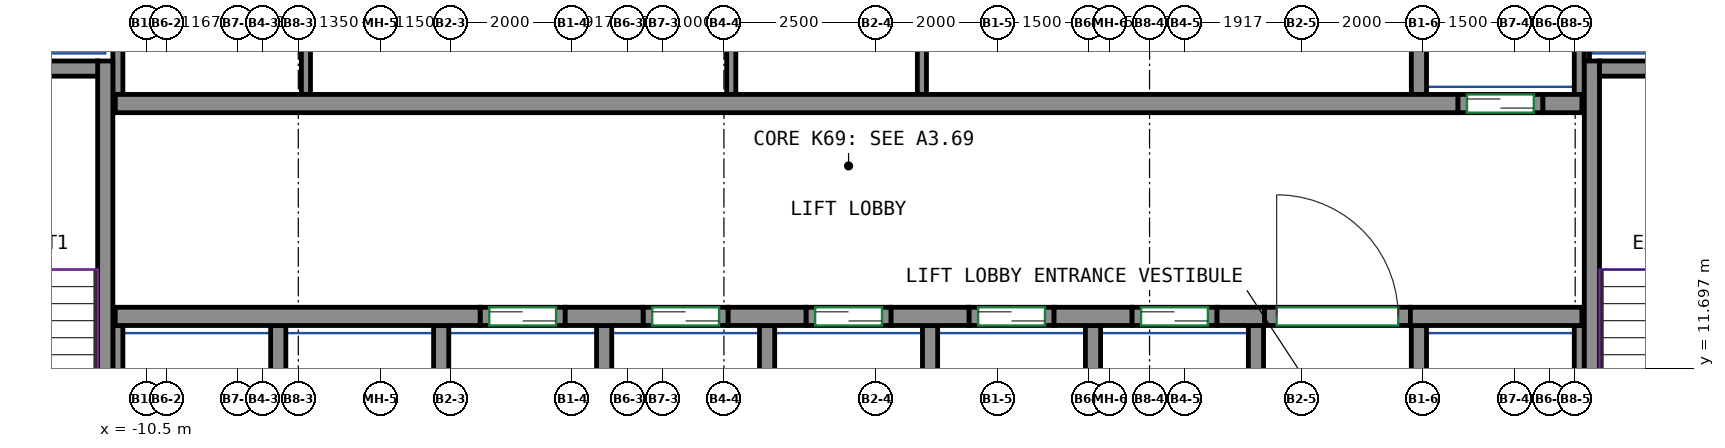
"""IFC4 building model, lengths in metres.
Left out: names, types, materials, properties, quantities, classifications, styles, units other than length and angle.
Written with IfcOpenShell. Run it as: python <this file> out.ifc"""

import sys

from ifc_helpers import new_model, si_unit, direction, frame, frame_2d, origin, place, context, subcontext, project, spatial, rectangle, extrude, source, transform, mapped, element, fill, save


model = new_model("IFC4")
c1 = context("Model", 3, precision=1e-05, world=origin(), true_north=direction((0.0, 1.0)))
c2 = subcontext(c1, "Body", "Model", "MODEL_VIEW")
j1 = project(units=[si_unit("LENGTHUNIT", "METRE"), si_unit("PLANEANGLEUNIT", "RADIAN")], contexts=[c1])
p1 = place(None, origin())
s1 = spatial("IfcSite", under=j1, at=p1, CompositionType="ELEMENT")
p2 = place(p1, origin())
s2 = spatial("IfcBuilding", under=s1, at=p2, CompositionType="ELEMENT")
p3 = place(p2, frame((0.0, 0.0, 277.2)))
s3 = spatial("IfcBuildingStorey", under=s2, at=p3, CompositionType="ELEMENT", Elevation=277.2)
m1 = source(origin(), c2, "Body", "SweptSolid", [
    extrude(rectangle(XDim=7.75, YDim=0.25, at=frame_2d((3.875, 0.0))), origin(), (0.0, 0.0, 1.0), 3.12),
])
p4 = place(p3, frame((-11.175, 9.0, 0.0), z_axis=(0.0, 0.0, 1.0), x_axis=(0.0, 1.0, 0.0)))
e1 = element("IfcWall", 1, at=p4, inside=s3, PredefinedType="SHEAR", context=c2, shape_type="MappedRepresentation", body=[
    mapped(m1, transform((0.0, 0.0, 0.0))),
])
m2 = source(origin(), c2, "Body", "SweptSolid", [
    extrude(rectangle(XDim=3.7, YDim=0.25, at=frame_2d((1.85, 0.0))), origin(), (0.0, 0.0, 1.0), 3.12),
])
p5 = place(p3, frame((-15.0, 16.625, 0.0), z_axis=(0.0, 0.0, 1.0), x_axis=(1.0, 0.0, 0.0)))
e2 = element("IfcWall", 2, at=p5, inside=s3, PredefinedType="SHEAR", context=c2, shape_type="MappedRepresentation", body=[
    mapped(m2, transform((0.0, 0.0, 0.0))),
])
p6 = place(p3, frame((13.275, 9.0, 0.0), z_axis=(0.0, 0.0, 1.0), x_axis=(0.0, 1.0, 0.0)))
e3 = element("IfcWall", 3, at=p6, inside=s3, PredefinedType="SHEAR", context=c2, shape_type="MappedRepresentation", body=[
    mapped(m1, transform((0.0, 0.0, 0.0))),
])
m3 = source(origin(), c2, "Body", "SweptSolid", [
    extrude(rectangle(XDim=3.7, YDim=0.25, at=frame_2d((1.85, 0.0))), origin(), (0.0, 0.0, 1.0), 3.12),
])
p7 = place(p3, frame((13.4, 16.625, 0.0), z_axis=(0.0, 0.0, 1.0), x_axis=(1.0, 0.0, 0.0)))
e4 = element("IfcWall", 4, at=p7, inside=s3, PredefinedType="SHEAR", context=c2, shape_type="MappedRepresentation", body=[
    mapped(m3, transform((0.0, 0.0, 0.0))),
])
m4 = source(origin(), c2, "Body", "SweptSolid", [
    extrude(rectangle(XDim=6.0, YDim=0.3, at=frame_2d((3.0, 0.0))), origin(), (0.0, 0.0, 1.0), 3.12),
])
p8 = place(p3, frame((-11.01, 12.55, 0.0), z_axis=(0.0, 0.0, 1.0), x_axis=(1.0, 0.0, 0.0)))
e5 = element("IfcWall", 5, at=p8, inside=s3, PredefinedType="SHEAR", context=c2, shape_type="MappedRepresentation", body=[
    mapped(m4, transform((0.0, 0.0, 0.0))),
])
m5 = source(origin(), c2, "Body", "SweptSolid", [
    extrude(rectangle(XDim=1.28, YDim=0.3, at=frame_2d((0.64, 0.0))), origin(), (0.0, 0.0, 1.0), 3.12),
])
for number, where, z_axis, x_axis in (
    (6, (-3.61, 12.55, 0.0), (0.0, 0.0, 1.0), (1.0, 0.0, 0.0)),
    (7, (-0.93, 12.55, 0.0), (0.0, 0.0, 1.0), (1.0, 0.0, 0.0)),
    (8, (1.75, 12.55, 0.0), (0.0, 0.0, 1.0), (1.0, 0.0, 0.0)),
    (9, (4.43, 12.55, 0.0), (0.0, 0.0, 1.0), (1.0, 0.0, 0.0)),
):
    element("IfcWall", number, at=place(p3, frame(where, z_axis=z_axis, x_axis=x_axis)), inside=s3, PredefinedType="SHEAR", context=c2, shape_type="MappedRepresentation", body=[
        mapped(m5, transform((0.0, 0.0, 0.0))),
    ])
m6 = source(origin(), c2, "Body", "SweptSolid", [
    extrude(rectangle(XDim=0.78, YDim=0.3, at=frame_2d((0.39, 0.0))), origin(), (0.0, 0.0, 1.0), 3.12),
])
p9 = place(p3, frame((7.11, 12.55, 0.0), z_axis=(0.0, 0.0, 1.0), x_axis=(1.0, 0.0, 0.0)))
e10 = element("IfcWall", 10, at=p9, inside=s3, PredefinedType="SHEAR", context=c2, shape_type="MappedRepresentation", body=[
    mapped(m6, transform((0.0, 0.0, 0.0))),
])
m7 = source(origin(), c2, "Body", "SweptSolid", [
    extrude(rectangle(XDim=2.82, YDim=0.3, at=frame_2d((1.41, 0.0))), origin(), (0.0, 0.0, 1.0), 3.12),
])
p10 = place(p3, frame((10.29, 12.55, 0.0), z_axis=(0.0, 0.0, 1.0), x_axis=(1.0, 0.0, 0.0)))
e11 = element("IfcWall", 11, at=p10, inside=s3, PredefinedType="SHEAR", context=c2, shape_type="MappedRepresentation", body=[
    mapped(m7, transform((0.0, 0.0, 0.0))),
])
m8 = source(origin(), c2, "Body", "SweptSolid", [
    extrude(rectangle(XDim=22.08, YDim=0.3, at=frame_2d((11.04, 0.0))), origin(), (0.0, 0.0, 1.0), 3.12),
])
p11 = place(p3, frame((-11.01, 16.05, 0.0), z_axis=(0.0, 0.0, 1.0), x_axis=(1.0, 0.0, 0.0)))
e12 = element("IfcWall", 12, at=p11, inside=s3, PredefinedType="SHEAR", context=c2, shape_type="MappedRepresentation", body=[
    mapped(m8, transform((0.0, 0.0, 0.0))),
])
m9 = source(origin(), c2, "Body", "SweptSolid", [
    extrude(rectangle(XDim=0.64, YDim=0.3, at=frame_2d((0.32, 0.0))), origin(), (0.0, 0.0, 1.0), 3.12),
])
p12 = place(p3, frame((12.47, 16.05, 0.0), z_axis=(0.0, 0.0, 1.0), x_axis=(1.0, 0.0, 0.0)))
e13 = element("IfcWall", 13, at=p12, inside=s3, PredefinedType="SHEAR", context=c2, shape_type="MappedRepresentation", body=[
    mapped(m9, transform((0.0, 0.0, 0.0))),
])
m10 = source(origin(), c2, "Body", "SweptSolid", [
    extrude(rectangle(XDim=1.4, YDim=0.3, at=frame_2d((0.7, 0.0))), origin(), (0.0, 0.0, 1.0), 3.12),
])
p13 = place(p3, frame((-5.01, 12.55, 0.0), z_axis=(0.0, 0.0, 1.0), x_axis=(1.0, 0.0, 0.0)))
e14 = element("IfcWall", 14, at=p13, inside=s3, PredefinedType="PARTITIONING", context=c2, shape_type="MappedRepresentation", body=[
    mapped(m10, transform((0.0, 0.0, 0.0))),
])
p14 = place(p13, frame((0.15, 0.0, 0.0)))
e15 = element("IfcOpeningElement", 15, at=p14, cuts=e14, PredefinedType="OPENING", context=c2, shape_type="SweptSolid", body=[
    extrude(rectangle(XDim=1.1, YDim=2.1, at=frame_2d((0.55, 1.05))), frame((0.0, 0.16, 0.0), z_axis=(0.0, -1.0, 0.0), x_axis=(1.0, 0.0, 0.0)), (0.0, 0.0, 1.0), 0.32),
])
m11 = source(origin(), c2, "Body", "SweptSolid", [
    extrude(rectangle(XDim=1.4, YDim=0.3, at=frame_2d((0.7, 0.0))), origin(), (0.0, 0.0, 1.0), 3.12),
])
p15 = place(p3, frame((-2.33, 12.55, 0.0), z_axis=(0.0, 0.0, 1.0), x_axis=(1.0, 0.0, 0.0)))
e16 = element("IfcWall", 16, at=p15, inside=s3, PredefinedType="PARTITIONING", context=c2, shape_type="MappedRepresentation", body=[
    mapped(m11, transform((0.0, 0.0, 0.0))),
])
p16 = place(p15, frame((0.15, 0.0, 0.0)))
e17 = element("IfcOpeningElement", 17, at=p16, cuts=e16, PredefinedType="OPENING", context=c2, shape_type="SweptSolid", body=[
    extrude(rectangle(XDim=1.1, YDim=2.1, at=frame_2d((0.55, 1.05))), frame((0.0, 0.16, 0.0), z_axis=(0.0, -1.0, 0.0), x_axis=(1.0, 0.0, 0.0)), (0.0, 0.0, 1.0), 0.32),
])
p17 = place(p3, frame((0.35, 12.55, 0.0), z_axis=(0.0, 0.0, 1.0), x_axis=(1.0, 0.0, 0.0)))
e18 = element("IfcWall", 18, at=p17, inside=s3, PredefinedType="PARTITIONING", context=c2, shape_type="MappedRepresentation", body=[
    mapped(m10, transform((0.0, 0.0, 0.0))),
])
p18 = place(p17, frame((0.15, 0.0, 0.0)))
e19 = element("IfcOpeningElement", 19, at=p18, cuts=e18, PredefinedType="OPENING", context=c2, shape_type="SweptSolid", body=[
    extrude(rectangle(XDim=1.1, YDim=2.1, at=frame_2d((0.55, 1.05))), frame((0.0, 0.16, 0.0), z_axis=(0.0, -1.0, 0.0), x_axis=(1.0, 0.0, 0.0)), (0.0, 0.0, 1.0), 0.32),
])
p19 = place(p3, frame((3.03, 12.55, 0.0), z_axis=(0.0, 0.0, 1.0), x_axis=(1.0, 0.0, 0.0)))
e20 = element("IfcWall", 20, at=p19, inside=s3, PredefinedType="PARTITIONING", context=c2, shape_type="MappedRepresentation", body=[
    mapped(m10, transform((0.0, 0.0, 0.0))),
])
p20 = place(p19, frame((0.15, 0.0, 0.0)))
e21 = element("IfcOpeningElement", 21, at=p20, cuts=e20, PredefinedType="OPENING", context=c2, shape_type="SweptSolid", body=[
    extrude(rectangle(XDim=1.1, YDim=2.1, at=frame_2d((0.55, 1.05))), frame((0.0, 0.16, 0.0), z_axis=(0.0, -1.0, 0.0), x_axis=(1.0, 0.0, 0.0)), (0.0, 0.0, 1.0), 0.32),
])
p21 = place(p3, frame((5.71, 12.55, 0.0), z_axis=(0.0, 0.0, 1.0), x_axis=(1.0, 0.0, 0.0)))
e22 = element("IfcWall", 22, at=p21, inside=s3, PredefinedType="PARTITIONING", context=c2, shape_type="MappedRepresentation", body=[
    mapped(m11, transform((0.0, 0.0, 0.0))),
])
p22 = place(p21, frame((0.15, 0.0, 0.0)))
e23 = element("IfcOpeningElement", 23, at=p22, cuts=e22, PredefinedType="OPENING", context=c2, shape_type="SweptSolid", body=[
    extrude(rectangle(XDim=1.1, YDim=2.1, at=frame_2d((0.55, 1.05))), frame((0.0, 0.16, 0.0), z_axis=(0.0, -1.0, 0.0), x_axis=(1.0, 0.0, 0.0)), (0.0, 0.0, 1.0), 0.32),
])
p23 = place(p3, frame((11.07, 16.05, 0.0), z_axis=(0.0, 0.0, 1.0), x_axis=(1.0, 0.0, 0.0)))
e24 = element("IfcWall", 24, at=p23, inside=s3, PredefinedType="PARTITIONING", context=c2, shape_type="MappedRepresentation", body=[
    mapped(m10, transform((0.0, 0.0, 0.0))),
])
p24 = place(p23, frame((0.15, 0.0, 0.0)))
e25 = element("IfcOpeningElement", 25, at=p24, cuts=e24, PredefinedType="OPENING", context=c2, shape_type="SweptSolid", body=[
    extrude(rectangle(XDim=1.1, YDim=2.1, at=frame_2d((0.55, 1.05))), frame((0.0, 0.16, 0.0), z_axis=(0.0, -1.0, 0.0), x_axis=(1.0, 0.0, 0.0)), (0.0, 0.0, 1.0), 0.32),
])
m12 = source(origin(), c2, "Body", "SweptSolid", [
    extrude(rectangle(XDim=2.4, YDim=0.3, at=frame_2d((1.2, 0.0))), origin(), (0.0, 0.0, 1.0), 3.12),
])
p25 = place(p3, frame((7.89, 12.55, 0.0), z_axis=(0.0, 0.0, 1.0), x_axis=(1.0, 0.0, 0.0)))
e26 = element("IfcWall", 26, at=p25, inside=s3, PredefinedType="PARTITIONING", context=c2, shape_type="MappedRepresentation", body=[
    mapped(m12, transform((0.0, 0.0, 0.0))),
])
p26 = place(p25, frame((0.2, 0.0, 0.0)))
e27 = element("IfcOpeningElement", 27, at=p26, cuts=e26, PredefinedType="OPENING", context=c2, shape_type="SweptSolid", body=[
    extrude(rectangle(XDim=2.0, YDim=2.1, at=frame_2d((1.0, 1.05))), frame((0.0, 0.16, 0.0), z_axis=(0.0, -1.0, 0.0), x_axis=(1.0, 0.0, 0.0)), (0.0, 0.0, 1.0), 0.32),
])
m13 = source(origin(), c2, "Body", "SweptSolid", [
    extrude(rectangle(XDim=3.275, YDim=0.165, at=frame_2d((1.638, 0.0))), origin(), (0.0, 0.0, 1.0), 3.12),
])
p27 = place(p3, frame((13.067, 16.2, 0.0), z_axis=(0.0, 0.0, 1.0), x_axis=(0.0, 1.0, 0.0)))
e28 = element("IfcWall", 28, at=p27, inside=s3, PredefinedType="PARTITIONING", context=c2, shape_type="MappedRepresentation", body=[
    mapped(m13, transform((0.0, 0.0, 0.0))),
])
m14 = source(origin(), c2, "Body", "SweptSolid", [
    extrude(rectangle(XDim=4.8, YDim=0.165, at=frame_2d((2.4, 0.0))), origin(), (0.0, 0.0, 1.0), 3.12),
])
p28 = place(p3, frame((-10.968, 16.2, 0.0), z_axis=(0.0, 0.0, 1.0), x_axis=(0.0, 1.0, 0.0)))
e29 = element("IfcWall", 29, at=p28, inside=s3, PredefinedType="PARTITIONING", context=c2, shape_type="MappedRepresentation", body=[
    mapped(m14, transform((0.0, 0.0, 0.0))),
])
m15 = source(origin(), c2, "Body", "SweptSolid", [
    extrude(rectangle(XDim=3.275, YDim=0.25, at=frame_2d((1.638, 0.0))), origin(), (0.0, 0.0, 1.0), 3.12),
])
p29 = place(p3, frame((10.43, 16.2, 0.0), z_axis=(0.0, 0.0, 1.0), x_axis=(0.0, 1.0, 0.0)))
e30 = element("IfcWall", 30, at=p29, inside=s3, PredefinedType="PARTITIONING", context=c2, shape_type="MappedRepresentation", body=[
    mapped(m15, transform((0.0, 0.0, 0.0))),
])
m16 = source(origin(), c2, "Body", "SweptSolid", [
    extrude(rectangle(XDim=2.725, YDim=0.085, at=frame_2d((1.363, 0.0))), origin(), (0.0, 0.0, 1.0), 3.12),
])
p30 = place(p3, frame((13.192, 16.75, 0.0), z_axis=(0.0, 0.0, 1.0), x_axis=(0.0, 1.0, 0.0)))
e31 = element("IfcWall", 31, at=p30, inside=s3, PredefinedType="PARTITIONING", context=c2, shape_type="MappedRepresentation", body=[
    mapped(m16, transform((0.0, 0.0, 0.0))),
])
m17 = source(origin(), c2, "Body", "SweptSolid", [
    extrude(rectangle(XDim=3.4, YDim=0.25, at=frame_2d((1.7, 0.0))), origin(), (0.0, 0.0, 1.0), 3.12),
])
p31 = place(p3, frame((10.43, 9.0, 0.0), z_axis=(0.0, 0.0, 1.0), x_axis=(0.0, 1.0, 0.0)))
e32 = element("IfcWall", 32, at=p31, inside=s3, PredefinedType="PARTITIONING", context=c2, shape_type="MappedRepresentation", body=[
    mapped(m17, transform((0.0, 0.0, 0.0))),
])
m18 = source(origin(), c2, "Body", "SweptSolid", [
    extrude(rectangle(XDim=3.4, YDim=0.165, at=frame_2d((1.7, 0.0))), origin(), (0.0, 0.0, 1.0), 3.12),
])
p32 = place(p3, frame((13.067, 9.0, 0.0), z_axis=(0.0, 0.0, 1.0), x_axis=(0.0, 1.0, 0.0)))
e33 = element("IfcWall", 33, at=p32, inside=s3, PredefinedType="PARTITIONING", context=c2, shape_type="MappedRepresentation", body=[
    mapped(m18, transform((0.0, 0.0, 0.0))),
])
for number, where, z_axis, x_axis in (
    (34, (2.39, 9.0, 0.0), (0.0, 0.0, 1.0), (0.0, 1.0, 0.0)),
    (35, (5.07, 9.0, 0.0), (0.0, 0.0, 1.0), (0.0, 1.0, 0.0)),
    (36, (7.75, 9.0, 0.0), (0.0, 0.0, 1.0), (0.0, 1.0, 0.0)),
    (37, (-0.29, 9.0, 0.0), (0.0, 0.0, 1.0), (0.0, 1.0, 0.0)),
):
    element("IfcWall", number, at=place(p3, frame(where, z_axis=z_axis, x_axis=x_axis)), inside=s3, PredefinedType="PARTITIONING", context=c2, shape_type="MappedRepresentation", body=[
        mapped(m17, transform((0.0, 0.0, 0.0))),
    ])
p33 = place(p3, frame((-10.968, 9.0, 0.0), z_axis=(0.0, 0.0, 1.0), x_axis=(0.0, 1.0, 0.0)))
e38 = element("IfcWall", 38, at=p33, inside=s3, PredefinedType="PARTITIONING", context=c2, shape_type="MappedRepresentation", body=[
    mapped(m18, transform((0.0, 0.0, 0.0))),
])
for number, where, z_axis, x_axis in (
    (39, (-2.97, 9.0, 0.0), (0.0, 0.0, 1.0), (0.0, 1.0, 0.0)),
    (40, (-5.65, 9.0, 0.0), (0.0, 0.0, 1.0), (0.0, 1.0, 0.0)),
    (41, (-8.33, 9.0, 0.0), (0.0, 0.0, 1.0), (0.0, 1.0, 0.0)),
):
    element("IfcWall", number, at=place(p3, frame(where, z_axis=z_axis, x_axis=x_axis)), inside=s3, PredefinedType="PARTITIONING", context=c2, shape_type="MappedRepresentation", body=[
        mapped(m17, transform((0.0, 0.0, 0.0))),
    ])
m19 = source(origin(), c2, "Body", "SweptSolid", [
    extrude(rectangle(XDim=4.8, YDim=0.15, at=frame_2d((2.4, 0.0))), origin(), (0.0, 0.0, 1.0), 3.12),
])
for number, where, z_axis, x_axis in (
    (42, (-7.875, 16.2, 0.0), (0.0, 0.0, 1.0), (0.0, 1.0, 0.0)),
    (43, (-0.88, 16.2, 0.0), (0.0, 0.0, 1.0), (0.0, 1.0, 0.0)),
    (44, (2.256, 16.2, 0.0), (0.0, 0.0, 1.0), (0.0, 1.0, 0.0)),
):
    element("IfcWall", number, at=place(p3, frame(where, z_axis=z_axis, x_axis=x_axis)), inside=s3, PredefinedType="PARTITIONING", context=c2, shape_type="MappedRepresentation", body=[
        mapped(m19, transform((0.0, 0.0, 0.0))),
    ])
p34 = place(p26, origin())
e45 = element("IfcDoor", 45, at=p34, inside=s3, OperationType="DOUBLE_DOOR_SINGLE_SWING", PredefinedType="DOOR", context=c2, shape_type="SweptSolid", body=[
    extrude(rectangle(XDim=2.0, YDim=2.1, at=frame_2d((1.0, 1.05))), frame((0.0, 0.025, 0.0), z_axis=(0.0, -1.0, 0.0), x_axis=(1.0, 0.0, 0.0)), (0.0, 0.0, 1.0), 0.05),
])
fill(e27, e45)
p35 = place(p14, origin())
e46 = element("IfcDoor", 46, at=p35, inside=s3, OperationType="DOUBLE_DOOR_SLIDING", PredefinedType="DOOR", context=c2, shape_type="SweptSolid", body=[
    extrude(rectangle(XDim=1.1, YDim=2.1, at=frame_2d((0.55, 1.05))), frame((0.0, 0.025, 0.0), z_axis=(0.0, -1.0, 0.0), x_axis=(1.0, 0.0, 0.0)), (0.0, 0.0, 1.0), 0.05),
])
fill(e15, e46)
p36 = place(p16, origin())
e47 = element("IfcDoor", 47, at=p36, inside=s3, OperationType="DOUBLE_DOOR_SLIDING", PredefinedType="DOOR", context=c2, shape_type="SweptSolid", body=[
    extrude(rectangle(XDim=1.1, YDim=2.1, at=frame_2d((0.55, 1.05))), frame((0.0, 0.025, 0.0), z_axis=(0.0, -1.0, 0.0), x_axis=(1.0, 0.0, 0.0)), (0.0, 0.0, 1.0), 0.05),
])
fill(e17, e47)
p37 = place(p18, origin())
e48 = element("IfcDoor", 48, at=p37, inside=s3, OperationType="DOUBLE_DOOR_SLIDING", PredefinedType="DOOR", context=c2, shape_type="SweptSolid", body=[
    extrude(rectangle(XDim=1.1, YDim=2.1, at=frame_2d((0.55, 1.05))), frame((0.0, 0.025, 0.0), z_axis=(0.0, -1.0, 0.0), x_axis=(1.0, 0.0, 0.0)), (0.0, 0.0, 1.0), 0.05),
])
fill(e19, e48)
p38 = place(p20, origin())
e49 = element("IfcDoor", 49, at=p38, inside=s3, OperationType="DOUBLE_DOOR_SLIDING", PredefinedType="DOOR", context=c2, shape_type="SweptSolid", body=[
    extrude(rectangle(XDim=1.1, YDim=2.1, at=frame_2d((0.55, 1.05))), frame((0.0, 0.025, 0.0), z_axis=(0.0, -1.0, 0.0), x_axis=(1.0, 0.0, 0.0)), (0.0, 0.0, 1.0), 0.05),
])
fill(e21, e49)
p39 = place(p22, origin())
e50 = element("IfcDoor", 50, at=p39, inside=s3, OperationType="DOUBLE_DOOR_SLIDING", PredefinedType="DOOR", context=c2, shape_type="SweptSolid", body=[
    extrude(rectangle(XDim=1.1, YDim=2.1, at=frame_2d((0.55, 1.05))), frame((0.0, 0.025, 0.0), z_axis=(0.0, -1.0, 0.0), x_axis=(1.0, 0.0, 0.0)), (0.0, 0.0, 1.0), 0.05),
])
fill(e23, e50)
p40 = place(p24, origin())
e51 = element("IfcDoor", 51, at=p40, inside=s3, OperationType="DOUBLE_DOOR_SLIDING", PredefinedType="DOOR", context=c2, shape_type="SweptSolid", body=[
    extrude(rectangle(XDim=1.1, YDim=2.1, at=frame_2d((0.55, 1.05))), frame((0.0, 0.025, 0.0), z_axis=(0.0, -1.0, 0.0), x_axis=(1.0, 0.0, 0.0)), (0.0, 0.0, 1.0), 0.05),
])
fill(e25, e51)
save(model, sys.argv[1])
